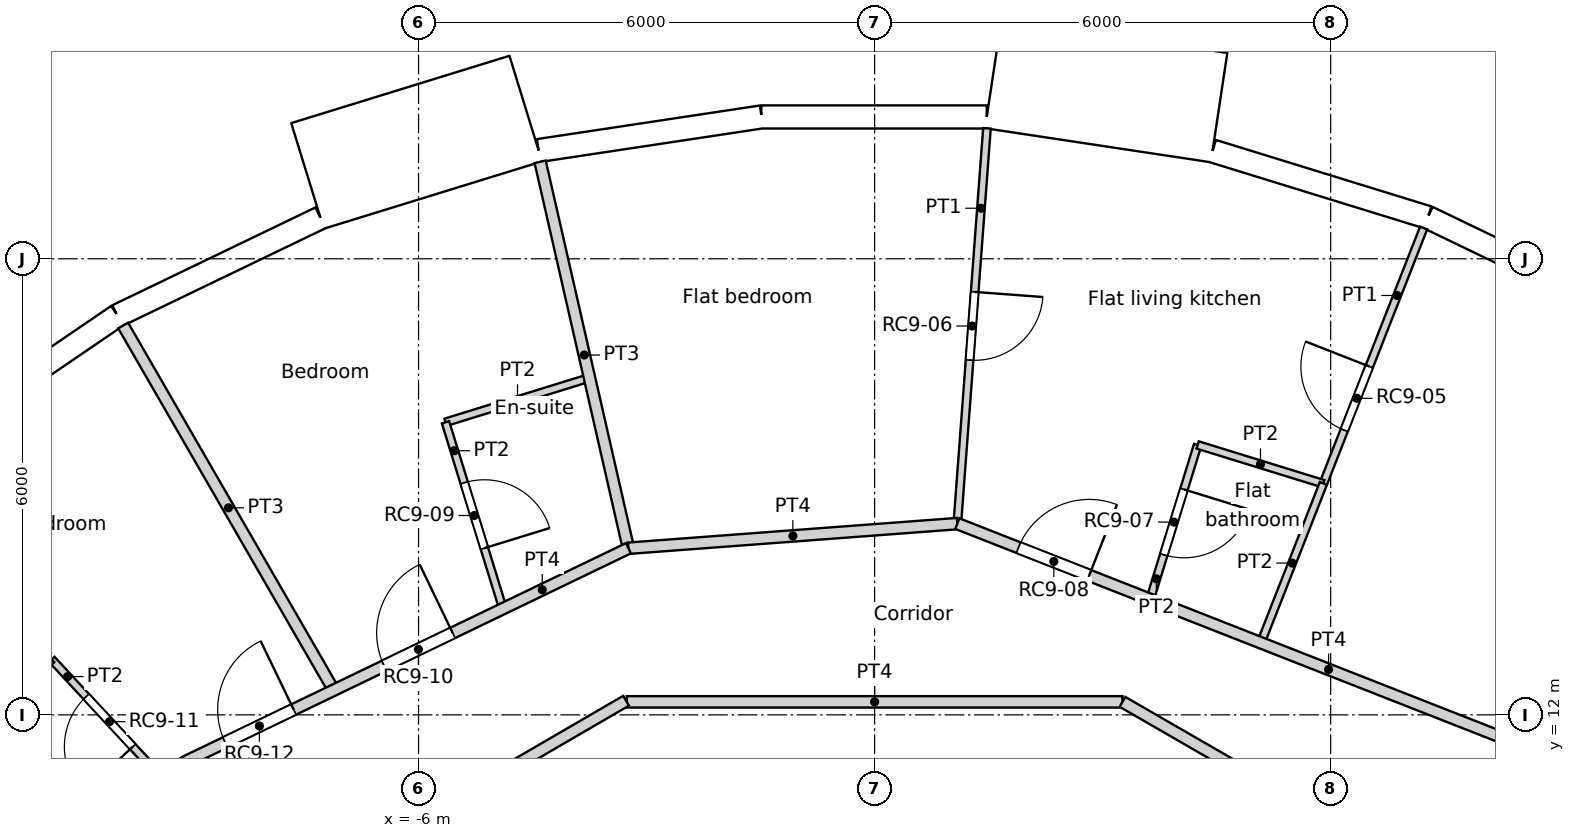
"""IFC4 building model, lengths in metres.
Left out: names, types, materials, properties, quantities, classifications, styles, units other than length and angle.
Written with IfcOpenShell. Run it as: python <this file> out.ifc"""

import sys

from ifc_helpers import new_model, si_unit, direction, frame, frame_2d, origin, origin_2d, place, context, subcontext, project, spatial, rectangle, circle, extrude, element, fill, save


model = new_model("IFC4")
c1 = context("Model", 3, precision=1e-05, world=origin(), true_north=direction((0.0, 1.0)))
c2 = subcontext(c1, "Body", "Model", "MODEL_VIEW")
j1 = project(units=[si_unit("LENGTHUNIT", "METRE"), si_unit("PLANEANGLEUNIT", "RADIAN")], contexts=[c1])
p1 = place(None, origin())
s1 = spatial("IfcSite", under=j1, at=p1, CompositionType="ELEMENT")
p2 = place(p1, origin())
s2 = spatial("IfcBuilding", under=s1, at=p2, CompositionType="ELEMENT")
p3 = place(p2, frame((0.0, 0.0, 316.2)))
s3 = spatial("IfcBuildingStorey", under=s2, at=p3, CompositionType="ELEMENT", Elevation=316.2)
for number, where, z_axis, x_axis in (
    (1, (6.876, 17.521, 0.0), (0.0, 0.0, 1.0), (1.0, 0.0, 0.0)),
    (2, (1.406, 18.77, 0.0), (0.0, 0.0, 1.0), (1.0, 0.0, 0.0)),
    (3, (-4.188, 18.35, 0.0), (0.0, 0.0, 1.0), (1.0, 0.0, 0.0)),
    (4, (-9.411, 16.301, 0.0), (0.0, 0.0, 1.0), (1.0, 0.0, 0.0)),
):
    element("IfcColumn", number, at=place(p3, frame(where, z_axis=z_axis, x_axis=x_axis)), inside=s3, PredefinedType="COLUMN", context=c2, shape_type="SweptSolid", body=[
        extrude(circle(Radius=0.45, at=origin_2d()), origin(), (0.0, 0.0, 1.0), 3.6),
    ])
p4 = place(p3, frame((9.947, 17.259, 0.0), z_axis=(0.0, 0.0, 1.0), x_axis=(-0.900939615635, 0.433944476838, 0.0)))
e5 = element("IfcWall", 5, at=p4, inside=s3, PredefinedType="SOLIDWALL", context=c2, shape_type="SweptSolid", body=[
    extrude(rectangle(XDim=2.962, YDim=0.3, at=frame_2d((1.481, 0.0))), origin(), (0.0, 0.0, 1.0), 3.25),
])
p5 = place(p4, frame((1.481, 0.0, 1.55)))
e6 = element("IfcOpeningElement", 6, at=p5, cuts=e5, PredefinedType="OPENING", context=c2, shape_type="SweptSolid", body=[
    extrude(circle(Radius=0.9, at=origin_2d()), frame((0.0, 0.16, 0.0), z_axis=(0.0, -1.0, 0.0), x_axis=(1.0, 0.0, 0.0)), (0.0, 0.0, 1.0), 0.32),
])
p6 = place(p3, frame((7.278, 18.545, 0.0), z_axis=(0.0, 0.0, 1.0), x_axis=(-0.95558635705, 0.294711238707, 0.0)))
e7 = element("IfcWall", 7, at=p6, inside=s3, PredefinedType="SOLIDWALL", context=c2, shape_type="SweptSolid", body=[
    extrude(rectangle(XDim=2.962, YDim=0.3, at=frame_2d((1.481, 0.0))), origin(), (0.0, 0.0, 1.0), 3.25),
])
p7 = place(p6, frame((1.481, 0.0, 1.55)))
e8 = element("IfcOpeningElement", 8, at=p7, cuts=e7, PredefinedType="OPENING", context=c2, shape_type="SweptSolid", body=[
    extrude(circle(Radius=0.9, at=origin_2d()), frame((0.0, 0.16, 0.0), z_axis=(0.0, -1.0, 0.0), x_axis=(1.0, 0.0, 0.0)), (0.0, 0.0, 1.0), 0.32),
])
p8 = place(p3, frame((4.53, 19.989, -0.35), z_axis=(0.0, 0.0, 1.0), x_axis=(-0.988836445254, 0.149004981587, 0.0)))
e9 = element("IfcWall", 9, at=p8, inside=s3, PredefinedType="ELEMENTEDWALL", context=c2, shape_type="SweptSolid", body=[
    extrude(rectangle(XDim=3.0, YDim=1.45, at=frame_2d((1.5, 0.0))), origin(), (0.0, 0.0, 1.0), 3.6),
])
p9 = place(p8, frame((1.5, 0.0, 1.9)))
e10 = element("IfcOpeningElement", 10, at=p9, cuts=e9, PredefinedType="OPENING", context=c2, shape_type="SweptSolid", body=[
    extrude(circle(Radius=0.9, at=origin_2d()), frame((0.0, 0.735, 0.0), z_axis=(0.0, -1.0, 0.0), x_axis=(1.0, 0.0, 0.0)), (0.0, 0.0, 1.0), 1.47),
])
p10 = place(p3, frame((1.473, 19.866, 0.0), z_axis=(0.0, 0.0, 1.0), x_axis=(-1.0, 0.0, 0.0)))
e11 = element("IfcWall", 11, at=p10, inside=s3, PredefinedType="SOLIDWALL", context=c2, shape_type="SweptSolid", body=[
    extrude(rectangle(XDim=2.962, YDim=0.3, at=frame_2d((1.481, 0.0))), origin(), (0.0, 0.0, 1.0), 3.25),
])
p11 = place(p10, frame((1.481, 0.0, 1.55)))
e12 = element("IfcOpeningElement", 12, at=p11, cuts=e11, PredefinedType="OPENING", context=c2, shape_type="SweptSolid", body=[
    extrude(circle(Radius=0.9, at=origin_2d()), frame((0.0, 0.16, 0.0), z_axis=(0.0, -1.0, 0.0), x_axis=(1.0, 0.0, 0.0)), (0.0, 0.0, 1.0), 0.32),
])
p12 = place(p3, frame((-1.489, 19.866, 0.0), z_axis=(0.0, 0.0, 1.0), x_axis=(-0.988835775663, -0.149009425104, 0.0)))
e13 = element("IfcWall", 13, at=p12, inside=s3, PredefinedType="SOLIDWALL", context=c2, shape_type="SweptSolid", body=[
    extrude(rectangle(XDim=2.962, YDim=0.3, at=frame_2d((1.481, 0.0))), origin(), (0.0, 0.0, 1.0), 3.25),
])
p13 = place(p12, frame((1.481, 0.0, 1.55)))
e14 = element("IfcOpeningElement", 14, at=p13, cuts=e13, PredefinedType="OPENING", context=c2, shape_type="SweptSolid", body=[
    extrude(circle(Radius=0.9, at=origin_2d()), frame((0.0, 0.16, 0.0), z_axis=(0.0, -1.0, 0.0), x_axis=(1.0, 0.0, 0.0)), (0.0, 0.0, 1.0), 0.32),
])
p14 = place(p3, frame((-4.592, 19.975, -0.35), z_axis=(0.0, 0.0, 1.0), x_axis=(-0.955571139978, -0.294760574774, 0.0)))
e15 = element("IfcWall", 15, at=p14, inside=s3, PredefinedType="ELEMENTEDWALL", context=c2, shape_type="SweptSolid", body=[
    extrude(rectangle(XDim=3.0, YDim=1.45, at=frame_2d((1.5, 0.0))), origin(), (0.0, 0.0, 1.0), 3.6),
])
p15 = place(p14, frame((1.5, 0.0, 1.9)))
e16 = element("IfcOpeningElement", 16, at=p15, cuts=e15, PredefinedType="OPENING", context=c2, shape_type="SweptSolid", body=[
    extrude(circle(Radius=0.9, at=origin_2d()), frame((0.0, 0.735, 0.0), z_axis=(0.0, -1.0, 0.0), x_axis=(1.0, 0.0, 0.0)), (0.0, 0.0, 1.0), 1.47),
])
p16 = place(p3, frame((-7.292, 18.538, 0.0), z_axis=(0.0, 0.0, 1.0), x_axis=(-0.90095513435, -0.433912255978, 0.0)))
e17 = element("IfcWall", 17, at=p16, inside=s3, PredefinedType="SOLIDWALL", context=c2, shape_type="SweptSolid", body=[
    extrude(rectangle(XDim=2.962, YDim=0.3, at=frame_2d((1.481, 0.0))), origin(), (0.0, 0.0, 1.0), 3.25),
])
p17 = place(p16, frame((1.481, 0.0, 1.55)))
e18 = element("IfcOpeningElement", 18, at=p17, cuts=e17, PredefinedType="OPENING", context=c2, shape_type="SweptSolid", body=[
    extrude(circle(Radius=0.9, at=origin_2d()), frame((0.0, 0.16, 0.0), z_axis=(0.0, -1.0, 0.0), x_axis=(1.0, 0.0, 0.0)), (0.0, 0.0, 1.0), 0.32),
])
p18 = place(p3, frame((-9.961, 17.253, 0.0), z_axis=(0.0, 0.0, 1.0), x_axis=(-0.826236061068, -0.563324037646, 0.0)))
e19 = element("IfcWall", 19, at=p18, inside=s3, PredefinedType="SOLIDWALL", context=c2, shape_type="SweptSolid", body=[
    extrude(rectangle(XDim=2.962, YDim=0.3, at=frame_2d((1.481, 0.0))), origin(), (0.0, 0.0, 1.0), 3.25),
])
p19 = place(p18, frame((1.481, 0.0, 1.55)))
e20 = element("IfcOpeningElement", 20, at=p19, cuts=e19, PredefinedType="OPENING", context=c2, shape_type="SweptSolid", body=[
    extrude(circle(Radius=0.9, at=origin_2d()), frame((0.0, 0.16, 0.0), z_axis=(0.0, -1.0, 0.0), x_axis=(1.0, 0.0, 0.0)), (0.0, 0.0, 1.0), 0.32),
])
p20 = place(p3, frame((-9.092, 8.8, 0.0), z_axis=(0.0, 0.0, 1.0), x_axis=(0.864470922103, 0.502682827277, 0.0)))
e21 = element("IfcWall", 21, at=p20, inside=s3, PredefinedType="PARTITIONING", context=c2, shape_type="SweptSolid", body=[
    extrude(rectangle(XDim=6.735, YDim=0.15, at=frame_2d((3.368, 0.0))), origin(), (0.0, 0.0, 1.0), 3.25),
])
p21 = place(p3, frame((-11.137, 8.803, 0.0), z_axis=(0.0, 0.0, 1.0), x_axis=(0.624018330412, 0.781409702595, 0.0)))
e22 = element("IfcWall", 22, at=p21, inside=s3, PredefinedType="PARTITIONING", context=c2, shape_type="SweptSolid", body=[
    extrude(rectangle(XDim=3.301, YDim=0.15, at=frame_2d((1.65, 0.0))), origin(), (0.0, 0.0, 1.0), 3.25),
])
p22 = place(p3, frame((3.261, 12.171, 0.0), z_axis=(0.0, 0.0, 1.0), x_axis=(0.866066809554, -0.499928276245, 0.0)))
e23 = element("IfcWall", 23, at=p22, inside=s3, PredefinedType="PARTITIONING", context=c2, shape_type="SweptSolid", body=[
    extrude(rectangle(XDim=6.743, YDim=0.15, at=frame_2d((3.371, 0.0))), origin(), (0.0, 0.0, 1.0), 3.25),
])
p23 = place(p3, frame((-3.261, 12.171, 0.0), z_axis=(0.0, 0.0, 1.0), x_axis=(1.0, 0.0, 0.0)))
e24 = element("IfcWall", 24, at=p23, inside=s3, PredefinedType="PARTITIONING", context=c2, shape_type="SweptSolid", body=[
    extrude(rectangle(XDim=6.522, YDim=0.15, at=frame_2d((3.261, 0.0))), origin(), (0.0, 0.0, 1.0), 3.25),
])
p24 = place(p3, frame((1.088, 14.516, 0.0), z_axis=(0.0, 0.0, 1.0), x_axis=(0.930800934608, -0.365526497168, 0.0)))
e25 = element("IfcWall", 25, at=p24, inside=s3, PredefinedType="PARTITIONING", context=c2, shape_type="SweptSolid", body=[
    extrude(rectangle(XDim=8.581, YDim=0.15, at=frame_2d((4.291, 0.0))), origin(), (0.0, 0.0, 1.0), 3.25),
])
p25 = place(p24, frame((0.864, 0.0, 0.0)))
e26 = element("IfcOpeningElement", 26, at=p25, cuts=e25, PredefinedType="OPENING", context=c2, shape_type="SweptSolid", body=[
    extrude(rectangle(XDim=1.0, YDim=2.1, at=frame_2d((0.5, 1.05))), frame((0.0, 0.075, 0.0), z_axis=(0.0, -1.0, 0.0), x_axis=(1.0, 0.0, 0.0)), (0.0, 0.0, 1.0), 0.15),
])
p26 = place(p3, frame((-3.239, 14.192, 0.0), z_axis=(0.0, 0.0, 1.0), x_axis=(0.997204448067, 0.074721407608, 0.0)))
e27 = element("IfcWall", 27, at=p26, inside=s3, PredefinedType="PARTITIONING", context=c2, shape_type="SweptSolid", body=[
    extrude(rectangle(XDim=4.339, YDim=0.15, at=frame_2d((2.169, 0.0))), origin(), (0.0, 0.0, 1.0), 3.25),
])
p27 = place(p3, frame((-9.076, 11.381, 0.0), z_axis=(0.0, 0.0, 1.0), x_axis=(0.900939467372, 0.433944784657, 0.0)))
e28 = element("IfcWall", 28, at=p27, inside=s3, PredefinedType="PARTITIONING", context=c2, shape_type="SweptSolid", body=[
    extrude(rectangle(XDim=6.479, YDim=0.15, at=frame_2d((3.239, 0.0))), origin(), (0.0, 0.0, 1.0), 3.25),
])
p28 = place(p27, frame((2.912, 0.0, 0.0)))
e29 = element("IfcOpeningElement", 29, at=p28, cuts=e28, PredefinedType="OPENING", context=c2, shape_type="SweptSolid", body=[
    extrude(rectangle(XDim=1.0, YDim=2.1, at=frame_2d((0.5, 1.05))), frame((0.0, 0.075, 0.0), z_axis=(0.0, -1.0, 0.0), x_axis=(1.0, 0.0, 0.0)), (0.0, 0.0, 1.0), 0.15),
])
p29 = place(p27, frame((0.59, 0.0, 0.0)))
e30 = element("IfcOpeningElement", 30, at=p29, cuts=e28, PredefinedType="OPENING", context=c2, shape_type="SweptSolid", body=[
    extrude(rectangle(XDim=1.0, YDim=2.1, at=frame_2d((0.5, 1.05))), frame((0.0, 0.075, 0.0), z_axis=(0.0, -1.0, 0.0), x_axis=(1.0, 0.0, 0.0)), (0.0, 0.0, 1.0), 0.15),
])
p30 = place(p3, frame((5.903, 15.041, 0.0), z_axis=(0.0, 0.0, 1.0), x_axis=(0.36523219083, 0.930916455318, 0.0)))
e31 = element("IfcWall", 31, at=p30, inside=s3, PredefinedType="PARTITIONING", context=c2, shape_type="SweptSolid", body=[
    extrude(rectangle(XDim=3.614, YDim=0.1, at=frame_2d((1.807, 0.0))), origin(), (0.0, 0.0, 1.0), 3.25),
])
p31 = place(p30, frame((0.757, 0.0, 0.0)))
e32 = element("IfcOpeningElement", 32, at=p31, cuts=e31, PredefinedType="OPENING", context=c2, shape_type="SweptSolid", body=[
    extrude(rectangle(XDim=0.9, YDim=2.1, at=frame_2d((0.45, 1.05))), frame((0.0, 0.05, 0.0), z_axis=(0.0, -1.0, 0.0), x_axis=(1.0, 0.0, 0.0)), (0.0, 0.0, 1.0), 0.1),
])
p32 = place(p3, frame((1.088, 14.516, 0.0), z_axis=(0.0, 0.0, 1.0), x_axis=(0.074816718541, 0.997197301755, 0.0)))
e33 = element("IfcWall", 33, at=p32, inside=s3, PredefinedType="PARTITIONING", context=c2, shape_type="SweptSolid", body=[
    extrude(rectangle(XDim=5.215, YDim=0.1, at=frame_2d((2.607, 0.0))), origin(), (0.0, 0.0, 1.0), 3.25),
])
p33 = place(p32, frame((2.157, 0.0, 0.0)))
e34 = element("IfcOpeningElement", 34, at=p33, cuts=e33, PredefinedType="OPENING", context=c2, shape_type="SweptSolid", body=[
    extrude(rectangle(XDim=0.9, YDim=2.1, at=frame_2d((0.45, 1.05))), frame((0.0, 0.05, 0.0), z_axis=(0.0, -1.0, 0.0), x_axis=(1.0, 0.0, 0.0)), (0.0, 0.0, 1.0), 0.1),
])
p34 = place(p3, frame((4.25, 15.551, 0.0), z_axis=(0.0, 0.0, 1.0), x_axis=(0.955555986234, -0.294809696536, 0.0)))
e35 = element("IfcWall", 35, at=p34, inside=s3, PredefinedType="PARTITIONING", context=c2, shape_type="SweptSolid", body=[
    extrude(rectangle(XDim=1.73, YDim=0.1, at=frame_2d((0.865, 0.0))), origin(), (0.0, 0.0, 1.0), 3.25),
])
p35 = place(p3, frame((3.624, 13.521, 0.0), z_axis=(0.0, 0.0, 1.0), x_axis=(0.294667251911, 0.955599921856, 0.0)))
e36 = element("IfcWall", 36, at=p35, inside=s3, PredefinedType="PARTITIONING", context=c2, shape_type="SweptSolid", body=[
    extrude(rectangle(XDim=2.124, YDim=0.1, at=frame_2d((1.062, 0.0))), origin(), (0.0, 0.0, 1.0), 3.25),
])
p36 = place(p35, frame((0.612, 0.0, 0.0)))
e37 = element("IfcOpeningElement", 37, at=p36, cuts=e36, PredefinedType="OPENING", context=c2, shape_type="SweptSolid", body=[
    extrude(rectangle(XDim=0.9, YDim=2.0, at=frame_2d((0.45, 1.0))), frame((0.0, 0.05, 0.0), z_axis=(0.0, -1.0, 0.0), x_axis=(1.0, 0.0, 0.0)), (0.0, 0.0, 1.0), 0.1),
])
p37 = place(p3, frame((5.082, 12.949, 0.0), z_axis=(0.0, 0.0, 1.0), x_axis=(0.365118857447, 0.930960912142, 0.0)))
e38 = element("IfcWall", 38, at=p37, inside=s3, PredefinedType="PARTITIONING", context=c2, shape_type="SweptSolid", body=[
    extrude(rectangle(XDim=2.251, YDim=0.1, at=frame_2d((1.126, 0.0))), origin(), (0.0, 0.0, 1.0), 3.25),
])
p38 = place(p3, frame((-4.4, 19.276, 0.0), z_axis=(0.0, 0.0, 1.0), x_axis=(0.222612505682, -0.974907007008, 0.0)))
e39 = element("IfcWall", 39, at=p38, inside=s3, PredefinedType="PARTITIONING", context=c2, shape_type="SweptSolid", body=[
    extrude(rectangle(XDim=5.215, YDim=0.15, at=frame_2d((2.607, 0.0))), origin(), (0.0, 0.0, 1.0), 3.25),
])
p39 = place(p3, frame((-5.645, 15.849, 0.0), z_axis=(0.0, 0.0, 1.0), x_axis=(0.955469584731, 0.295089601059, 0.0)))
e40 = element("IfcWall", 40, at=p39, inside=s3, PredefinedType="PARTITIONING", context=c2, shape_type="SweptSolid", body=[
    extrude(rectangle(XDim=1.982, YDim=0.1, at=frame_2d((0.991, 0.0))), origin(), (0.0, 0.0, 1.0), 3.25),
])
p40 = place(p3, frame((-5.645, 15.849, 0.0), z_axis=(0.0, 0.0, 1.0), x_axis=(0.294654076104, -0.955603984627, 0.0)))
e41 = element("IfcWall", 41, at=p40, inside=s3, PredefinedType="PARTITIONING", context=c2, shape_type="SweptSolid", body=[
    extrude(rectangle(XDim=2.566, YDim=0.1, at=frame_2d((1.283, 0.0))), origin(), (0.0, 0.0, 1.0), 3.25),
])
p41 = place(p40, frame((0.833, 0.0, 0.0)))
e42 = element("IfcOpeningElement", 42, at=p41, cuts=e41, PredefinedType="OPENING", context=c2, shape_type="SweptSolid", body=[
    extrude(rectangle(XDim=0.9, YDim=2.04, at=frame_2d((0.45, 1.02))), frame((0.0, 0.05, 0.0), z_axis=(0.0, -1.0, 0.0), x_axis=(1.0, 0.0, 0.0)), (0.0, 0.0, 1.0), 0.1),
])
p42 = place(p3, frame((-9.886, 17.122, 0.0), z_axis=(0.0, 0.0, 1.0), x_axis=(0.500054359786, -0.865994016873, 0.0)))
e43 = element("IfcWall", 43, at=p42, inside=s3, PredefinedType="PARTITIONING", context=c2, shape_type="SweptSolid", body=[
    extrude(rectangle(XDim=5.54, YDim=0.15, at=frame_2d((2.77, 0.0))), origin(), (0.0, 0.0, 1.0), 3.25),
])
p43 = place(p3, frame((-10.826, 12.73, 0.0), z_axis=(0.0, 0.0, 1.0), x_axis=(0.680228963773, -0.732999697711, 0.0)))
e44 = element("IfcWall", 44, at=p43, inside=s3, PredefinedType="PARTITIONING", context=c2, shape_type="SweptSolid", body=[
    extrude(rectangle(XDim=2.235, YDim=0.1, at=frame_2d((1.117, 0.0))), origin(), (0.0, 0.0, 1.0), 3.25),
])
p44 = place(p43, frame((0.667, 0.0, 0.0)))
e45 = element("IfcOpeningElement", 45, at=p44, cuts=e44, PredefinedType="OPENING", context=c2, shape_type="SweptSolid", body=[
    extrude(rectangle(XDim=0.9, YDim=2.04, at=frame_2d((0.45, 1.02))), frame((0.0, 0.05, 0.0), z_axis=(0.0, -1.0, 0.0), x_axis=(1.0, 0.0, 0.0)), (0.0, 0.0, 1.0), 0.1),
])
p45 = place(p3, frame((-12.273, 11.387, 0.0), z_axis=(0.0, 0.0, 1.0), x_axis=(0.732956436026, 0.680275578636, 0.0)))
e46 = element("IfcWall", 46, at=p45, inside=s3, PredefinedType="PARTITIONING", context=c2, shape_type="SweptSolid", body=[
    extrude(rectangle(XDim=1.974, YDim=0.1, at=frame_2d((0.987, 0.0))), origin(), (0.0, 0.0, 1.0), 3.25),
])
p46 = place(p3, frame((-14.493, 13.448, 0.0), z_axis=(0.0, 0.0, 1.0), x_axis=(0.732845293448, -0.680395308531, 0.0)))
e47 = element("IfcWall", 47, at=p46, inside=s3, PredefinedType="PARTITIONING", context=c2, shape_type="SweptSolid", body=[
    extrude(rectangle(XDim=5.539, YDim=0.15, at=frame_2d((2.77, 0.0))), origin(), (0.0, 0.0, 1.0), 3.25),
])
p47 = place(p5, origin())
e48 = element("IfcWindow", 48, at=p47, inside=s3, PartitioningType="SINGLE_PANEL", PredefinedType="WINDOW", context=c2, shape_type="SweptSolid", body=[
    extrude(circle(Radius=0.9, at=origin_2d()), frame((0.0, 0.12, 0.0), z_axis=(0.0, -1.0, 0.0), x_axis=(1.0, 0.0, 0.0)), (0.0, 0.0, 1.0), 0.1),
])
fill(e6, e48)
p48 = place(p7, origin())
e49 = element("IfcWindow", 49, at=p48, inside=s3, PartitioningType="SINGLE_PANEL", PredefinedType="WINDOW", context=c2, shape_type="SweptSolid", body=[
    extrude(circle(Radius=0.9, at=origin_2d()), frame((0.0, 0.12, 0.0), z_axis=(0.0, -1.0, 0.0), x_axis=(1.0, 0.0, 0.0)), (0.0, 0.0, 1.0), 0.1),
])
fill(e8, e49)
p49 = place(p9, origin())
e50 = element("IfcWindow", 50, at=p49, inside=s3, PartitioningType="SINGLE_PANEL", PredefinedType="WINDOW", context=c2, shape_type="SweptSolid", body=[
    extrude(circle(Radius=0.9, at=origin_2d()), frame((0.0, 0.695, 0.0), z_axis=(0.0, -1.0, 0.0), x_axis=(1.0, 0.0, 0.0)), (0.0, 0.0, 1.0), 0.1),
])
fill(e10, e50)
p50 = place(p11, origin())
e51 = element("IfcWindow", 51, at=p50, inside=s3, PartitioningType="SINGLE_PANEL", PredefinedType="WINDOW", context=c2, shape_type="SweptSolid", body=[
    extrude(circle(Radius=0.9, at=origin_2d()), frame((0.0, 0.12, 0.0), z_axis=(0.0, -1.0, 0.0), x_axis=(1.0, 0.0, 0.0)), (0.0, 0.0, 1.0), 0.1),
])
fill(e12, e51)
p51 = place(p13, origin())
e52 = element("IfcWindow", 52, at=p51, inside=s3, PartitioningType="SINGLE_PANEL", PredefinedType="WINDOW", context=c2, shape_type="SweptSolid", body=[
    extrude(circle(Radius=0.9, at=origin_2d()), frame((0.0, 0.12, 0.0), z_axis=(0.0, -1.0, 0.0), x_axis=(1.0, 0.0, 0.0)), (0.0, 0.0, 1.0), 0.1),
])
fill(e14, e52)
p52 = place(p15, origin())
e53 = element("IfcWindow", 53, at=p52, inside=s3, PartitioningType="SINGLE_PANEL", PredefinedType="WINDOW", context=c2, shape_type="SweptSolid", body=[
    extrude(circle(Radius=0.9, at=origin_2d()), frame((0.0, 0.695, 0.0), z_axis=(0.0, -1.0, 0.0), x_axis=(1.0, 0.0, 0.0)), (0.0, 0.0, 1.0), 0.1),
])
fill(e16, e53)
p53 = place(p17, origin())
e54 = element("IfcWindow", 54, at=p53, inside=s3, PartitioningType="SINGLE_PANEL", PredefinedType="WINDOW", context=c2, shape_type="SweptSolid", body=[
    extrude(circle(Radius=0.9, at=origin_2d()), frame((0.0, 0.12, 0.0), z_axis=(0.0, -1.0, 0.0), x_axis=(1.0, 0.0, 0.0)), (0.0, 0.0, 1.0), 0.1),
])
fill(e18, e54)
p54 = place(p19, origin())
e55 = element("IfcWindow", 55, at=p54, inside=s3, PartitioningType="SINGLE_PANEL", PredefinedType="WINDOW", context=c2, shape_type="SweptSolid", body=[
    extrude(circle(Radius=0.9, at=origin_2d()), frame((0.0, 0.12, 0.0), z_axis=(0.0, -1.0, 0.0), x_axis=(1.0, 0.0, 0.0)), (0.0, 0.0, 1.0), 0.1),
])
fill(e20, e55)
p55 = place(p31, origin())
e56 = element("IfcDoor", 56, at=p55, inside=s3, OperationType="SINGLE_SWING_RIGHT", PredefinedType="DOOR", context=c2, shape_type="SweptSolid", body=[
    extrude(rectangle(XDim=0.9, YDim=2.1, at=frame_2d((0.45, 1.05))), frame((0.0, 0.025, 0.0), z_axis=(0.0, -1.0, 0.0), x_axis=(1.0, 0.0, 0.0)), (0.0, 0.0, 1.0), 0.05),
])
fill(e32, e56)
p56 = place(p33, origin())
e57 = element("IfcDoor", 57, at=p56, inside=s3, OperationType="SINGLE_SWING_LEFT", PredefinedType="DOOR", context=c2, shape_type="SweptSolid", body=[
    extrude(rectangle(XDim=0.9, YDim=2.1, at=frame_2d((0.45, 1.05))), frame((0.0, 0.025, 0.0), z_axis=(0.0, -1.0, 0.0), x_axis=(1.0, 0.0, 0.0)), (0.0, 0.0, 1.0), 0.05),
])
fill(e34, e57)
p57 = place(p36, origin())
e58 = element("IfcDoor", 58, at=p57, inside=s3, OperationType="SINGLE_SWING_LEFT", PredefinedType="DOOR", context=c2, shape_type="SweptSolid", body=[
    extrude(rectangle(XDim=0.9, YDim=2.0, at=frame_2d((0.45, 1.0))), frame((0.0, 0.025, 0.0), z_axis=(0.0, -1.0, 0.0), x_axis=(1.0, 0.0, 0.0)), (0.0, 0.0, 1.0), 0.05),
])
fill(e37, e58)
p58 = place(p25, origin())
e59 = element("IfcDoor", 59, at=p58, inside=s3, OperationType="SINGLE_SWING_RIGHT", PredefinedType="DOOR", context=c2, shape_type="SweptSolid", body=[
    extrude(rectangle(XDim=1.0, YDim=2.1, at=frame_2d((0.5, 1.05))), frame((0.0, 0.025, 0.0), z_axis=(0.0, -1.0, 0.0), x_axis=(1.0, 0.0, 0.0)), (0.0, 0.0, 1.0), 0.05),
])
fill(e26, e59)
p59 = place(p41, origin())
e60 = element("IfcDoor", 60, at=p59, inside=s3, OperationType="SINGLE_SWING_RIGHT", PredefinedType="DOOR", context=c2, shape_type="SweptSolid", body=[
    extrude(rectangle(XDim=0.9, YDim=2.04, at=frame_2d((0.45, 1.02))), frame((0.0, 0.025, 0.0), z_axis=(0.0, -1.0, 0.0), x_axis=(1.0, 0.0, 0.0)), (0.0, 0.0, 1.0), 0.05),
])
fill(e42, e60)
p60 = place(p28, origin())
e61 = element("IfcDoor", 61, at=p60, inside=s3, OperationType="SINGLE_SWING_RIGHT", PredefinedType="DOOR", context=c2, shape_type="SweptSolid", body=[
    extrude(rectangle(XDim=1.0, YDim=2.1, at=frame_2d((0.5, 1.05))), frame((0.0, 0.025, 0.0), z_axis=(0.0, -1.0, 0.0), x_axis=(1.0, 0.0, 0.0)), (0.0, 0.0, 1.0), 0.05),
])
fill(e29, e61)
p61 = place(p44, origin())
e62 = element("IfcDoor", 62, at=p61, inside=s3, OperationType="SINGLE_SWING_LEFT", PredefinedType="DOOR", context=c2, shape_type="SweptSolid", body=[
    extrude(rectangle(XDim=0.9, YDim=2.04, at=frame_2d((0.45, 1.02))), frame((0.0, 0.025, 0.0), z_axis=(0.0, -1.0, 0.0), x_axis=(1.0, 0.0, 0.0)), (0.0, 0.0, 1.0), 0.05),
])
fill(e45, e62)
p62 = place(p29, origin())
e63 = element("IfcDoor", 63, at=p62, inside=s3, OperationType="SINGLE_SWING_RIGHT", PredefinedType="DOOR", context=c2, shape_type="SweptSolid", body=[
    extrude(rectangle(XDim=1.0, YDim=2.1, at=frame_2d((0.5, 1.05))), frame((0.0, 0.025, 0.0), z_axis=(0.0, -1.0, 0.0), x_axis=(1.0, 0.0, 0.0)), (0.0, 0.0, 1.0), 0.05),
])
fill(e30, e63)
save(model, sys.argv[1])
